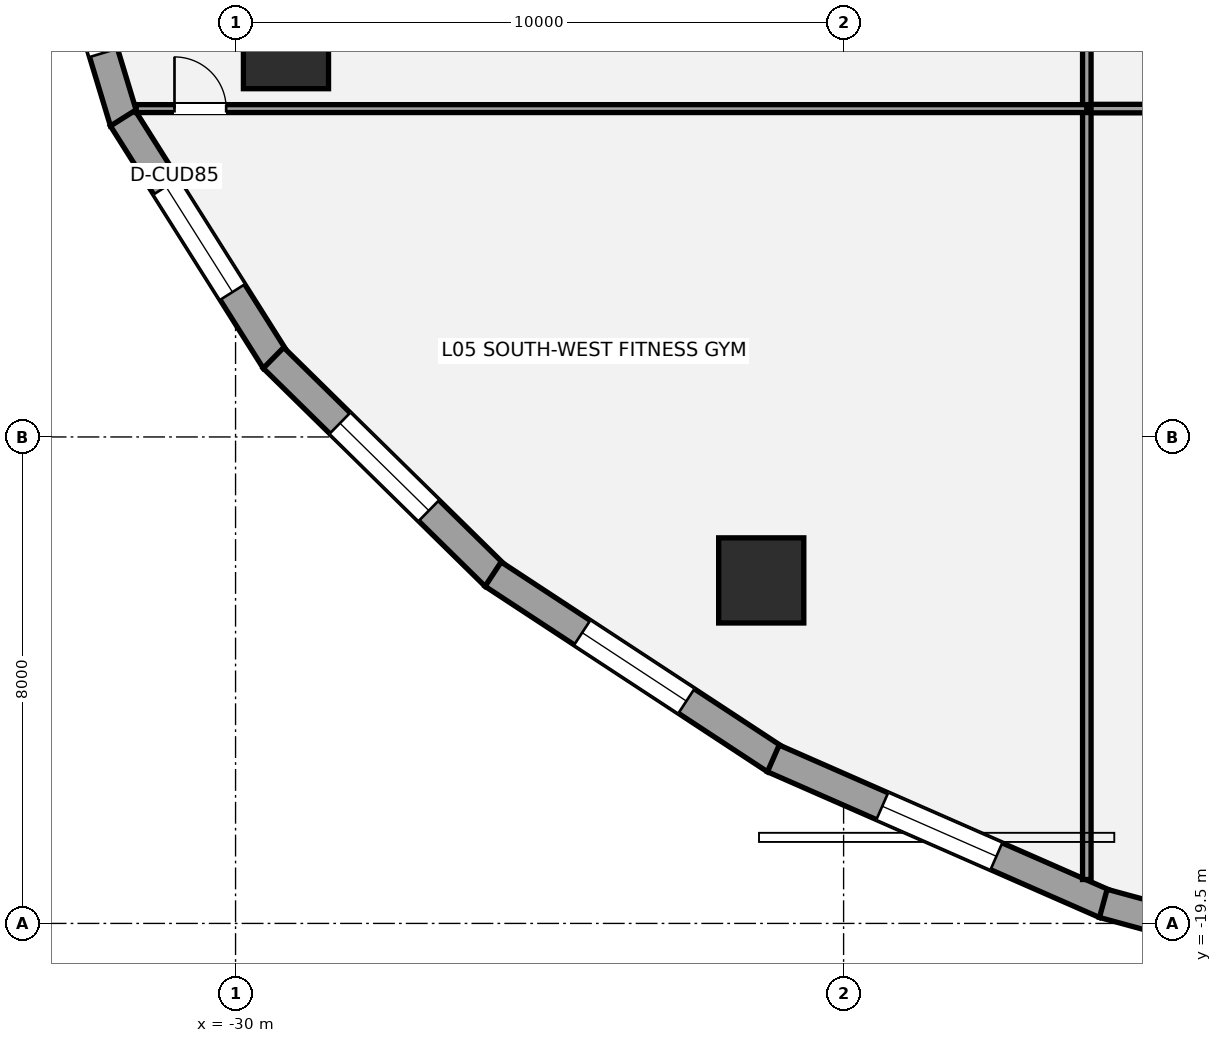
"""IFC4 building model, lengths in metres.
Left out: names, types, materials, properties, quantities, classifications, styles, units other than length and angle.
Written with IfcOpenShell. Run it as: python <this file> out.ifc"""

import sys

from ifc_helpers import new_model, si_unit, direction, frame, frame_2d, origin, origin_2d, place, context, subcontext, project, spatial, rectangle, hollow_circle, extrude, element, fill, save


model = new_model("IFC4")
c1 = context("Model", 3, precision=1e-05, world=origin(), true_north=direction((0.0, 1.0)))
c2 = subcontext(c1, "Body", "Model", "MODEL_VIEW")
j1 = project(units=[si_unit("LENGTHUNIT", "METRE"), si_unit("PLANEANGLEUNIT", "RADIAN")], contexts=[c1])
p1 = place(None, origin())
s1 = spatial("IfcSite", under=j1, at=p1, CompositionType="ELEMENT")
p2 = place(p1, origin())
s2 = spatial("IfcBuilding", under=s1, at=p2, CompositionType="ELEMENT")
p3 = place(p2, frame((0.0, 0.0, 22.8)))
s3 = spatial("IfcBuildingStorey", under=s2, at=p3, CompositionType="ELEMENT", Elevation=22.8)
for number, where, z_axis, x_axis in (
    (1, (-29.171, -5.073, 0.0), (0.0, 0.0, 1.0), (1.0, 0.0, 0.0)),
    (2, (-21.354, -13.859, 0.0), (0.0, 0.0, 1.0), (1.0, 0.0, 0.0)),
):
    element("IfcColumn", number, at=place(p3, frame(where, z_axis=z_axis, x_axis=x_axis)), inside=s3, PredefinedType="USERDEFINED", context=c2, shape_type="SweptSolid", body=[
        extrude(hollow_circle(Radius=0.7, WallThickness=0.05, at=origin_2d()), origin(), (0.0, 0.0, 1.0), 4.13),
    ])
p4 = place(p3, frame((-31.828, -6.317, 0.0), z_axis=(0.0, 0.0, 1.0), x_axis=(-0.289855603468, 0.957070388811, 0.0)))
e3 = element("IfcWall", 3, at=p4, inside=s3, PredefinedType="STANDARD", context=c2, shape_type="SweptSolid", body=[
    extrude(rectangle(XDim=4.419, YDim=0.48, at=frame_2d((2.21, 0.0))), origin(), (0.0, 0.0, 1.0), 3.033),
])
p5 = place(p4, frame((1.185, 0.0, 0.72)))
e4 = element("IfcOpeningElement", 4, at=p5, cuts=e3, PredefinedType="OPENING", context=c2, shape_type="SweptSolid", body=[
    extrude(rectangle(XDim=2.05, YDim=1.8, at=frame_2d((1.025, 0.9))), frame((0.0, 0.25, 0.0), z_axis=(0.0, -1.0, 0.0), x_axis=(1.0, 0.0, 0.0)), (0.0, 0.0, 1.0), 0.5),
])
p6 = place(p3, frame((-29.341, -10.243, 0.0), z_axis=(0.0, 0.0, 1.0), x_axis=(-0.53349762721, 0.845801561693, 0.0)))
e5 = element("IfcWall", 5, at=p6, inside=s3, PredefinedType="STANDARD", context=c2, shape_type="SweptSolid", body=[
    extrude(rectangle(XDim=4.711, YDim=0.48, at=frame_2d((2.355, 0.0))), origin(), (0.0, 0.0, 1.0), 3.033),
])
p7 = place(p6, frame((1.33, 0.0, 0.72)))
e6 = element("IfcOpeningElement", 6, at=p7, cuts=e5, PredefinedType="OPENING", context=c2, shape_type="SweptSolid", body=[
    extrude(rectangle(XDim=2.05, YDim=1.8, at=frame_2d((1.025, 0.9))), frame((0.0, 0.25, 0.0), z_axis=(0.0, -1.0, 0.0), x_axis=(1.0, 0.0, 0.0)), (0.0, 0.0, 1.0), 0.5),
])
p8 = place(p3, frame((-25.728, -13.785, 0.0), z_axis=(0.0, 0.0, 1.0), x_axis=(-0.713189080178, 0.700971708355, 0.0)))
e7 = element("IfcWall", 7, at=p8, inside=s3, PredefinedType="STANDARD", context=c2, shape_type="SweptSolid", body=[
    extrude(rectangle(XDim=5.116, YDim=0.48, at=frame_2d((2.558, 0.0))), origin(), (0.0, 0.0, 1.0), 3.033),
])
p9 = place(p8, frame((1.533, 0.0, 0.72)))
e8 = element("IfcOpeningElement", 8, at=p9, cuts=e7, PredefinedType="OPENING", context=c2, shape_type="SweptSolid", body=[
    extrude(rectangle(XDim=2.05, YDim=1.8, at=frame_2d((1.025, 0.9))), frame((0.0, 0.25, 0.0), z_axis=(0.0, -1.0, 0.0), x_axis=(1.0, 0.0, 0.0)), (0.0, 0.0, 1.0), 0.5),
])
p10 = place(p3, frame((-21.121, -16.806, 0.0), z_axis=(0.0, 0.0, 1.0), x_axis=(-0.835863918172, 0.548936708827, 0.0)))
e9 = element("IfcWall", 9, at=p10, inside=s3, PredefinedType="STANDARD", context=c2, shape_type="SweptSolid", body=[
    extrude(rectangle(XDim=5.555, YDim=0.48, at=frame_2d((2.778, 0.0))), origin(), (0.0, 0.0, 1.0), 3.033),
])
p11 = place(p10, frame((1.753, 0.0, 0.72)))
e10 = element("IfcOpeningElement", 10, at=p11, cuts=e9, PredefinedType="OPENING", context=c2, shape_type="SweptSolid", body=[
    extrude(rectangle(XDim=2.05, YDim=1.8, at=frame_2d((1.025, 0.9))), frame((0.0, 0.25, 0.0), z_axis=(0.0, -1.0, 0.0), x_axis=(1.0, 0.0, 0.0)), (0.0, 0.0, 1.0), 0.5),
])
p12 = place(p3, frame((-15.695, -19.183, 0.0), z_axis=(0.0, 0.0, 1.0), x_axis=(-0.91570760638, 0.401845218484, 0.0)))
e11 = element("IfcWall", 11, at=p12, inside=s3, PredefinedType="STANDARD", context=c2, shape_type="SweptSolid", body=[
    extrude(rectangle(XDim=5.963, YDim=0.48, at=frame_2d((2.981, 0.0))), origin(), (0.0, 0.0, 1.0), 3.033),
])
p13 = place(p12, frame((1.957, 0.0, 0.72)))
e12 = element("IfcOpeningElement", 12, at=p13, cuts=e11, PredefinedType="OPENING", context=c2, shape_type="SweptSolid", body=[
    extrude(rectangle(XDim=2.05, YDim=1.8, at=frame_2d((1.025, 0.9))), frame((0.0, 0.25, 0.0), z_axis=(0.0, -1.0, 0.0), x_axis=(1.0, 0.0, 0.0)), (0.0, 0.0, 1.0), 0.5),
])
p14 = place(p3, frame((-9.662, -20.821, 0.0), z_axis=(0.0, 0.0, 1.0), x_axis=(-0.964936550718, 0.262483243445, 0.0)))
e13 = element("IfcWall", 13, at=p14, inside=s3, PredefinedType="STANDARD", context=c2, shape_type="SweptSolid", body=[
    extrude(rectangle(XDim=6.288, YDim=0.48, at=frame_2d((3.144, 0.0))), origin(), (0.0, 0.0, 1.0), 3.033),
])
p15 = place(p14, frame((2.119, 0.0, 0.72)))
e14 = element("IfcOpeningElement", 14, at=p15, cuts=e13, PredefinedType="OPENING", context=c2, shape_type="SweptSolid", body=[
    extrude(rectangle(XDim=2.05, YDim=1.8, at=frame_2d((1.025, 0.9))), frame((0.0, 0.25, 0.0), z_axis=(0.0, -1.0, 0.0), x_axis=(1.0, 0.0, 0.0)), (0.0, 0.0, 1.0), 0.5),
])
p16 = place(p3, frame((-16.0, -6.1, 0.0), z_axis=(0.0, 0.0, 1.0), x_axis=(1.0, 0.0, 0.0)))
e15 = element("IfcWall", 15, at=p16, inside=s3, PredefinedType="PARTITIONING", context=c2, shape_type="SweptSolid", body=[
    extrude(rectangle(XDim=34.4, YDim=0.14, at=frame_2d((17.2, 0.0))), origin(), (0.0, 0.0, 1.0), 2.09),
])
p17 = place(p16, frame((5.5, 0.0, 0.0)))
e16 = element("IfcOpeningElement", 16, at=p17, cuts=e15, PredefinedType="OPENING", context=c2, shape_type="SweptSolid", body=[
    extrude(rectangle(XDim=0.85, YDim=2.0, at=frame_2d((0.425, 1.0))), frame((0.0, 0.08, 0.0), z_axis=(0.0, -1.0, 0.0), x_axis=(1.0, 0.0, 0.0)), (0.0, 0.0, 1.0), 0.16),
])
p18 = place(p16, frame((17.9, 0.0, 0.0)))
e17 = element("IfcOpeningElement", 17, at=p18, cuts=e15, PredefinedType="OPENING", context=c2, shape_type="SweptSolid", body=[
    extrude(rectangle(XDim=0.85, YDim=2.0, at=frame_2d((0.425, 1.0))), frame((0.0, 0.08, 0.0), z_axis=(0.0, -1.0, 0.0), x_axis=(1.0, 0.0, 0.0)), (0.0, 0.0, 1.0), 0.16),
])
p19 = place(p16, frame((28.85, 0.0, 0.0)))
e18 = element("IfcOpeningElement", 18, at=p19, cuts=e15, PredefinedType="OPENING", context=c2, shape_type="SweptSolid", body=[
    extrude(rectangle(XDim=0.85, YDim=2.0, at=frame_2d((0.425, 1.0))), frame((0.0, 0.08, 0.0), z_axis=(0.0, -1.0, 0.0), x_axis=(1.0, 0.0, 0.0)), (0.0, 0.0, 1.0), 0.16),
])
p20 = place(p3, frame((-16.0, -18.778, 0.0), z_axis=(0.0, 0.0, 1.0), x_axis=(0.0, 1.0, 0.0)))
e19 = element("IfcWall", 19, at=p20, inside=s3, PredefinedType="PARTITIONING", context=c2, shape_type="SweptSolid", body=[
    extrude(rectangle(XDim=26.328, YDim=0.14, at=frame_2d((13.164, 0.0))), origin(), (0.0, 0.0, 1.0), 2.09),
])
p21 = place(p20, frame((14.378, 0.0, 0.0)))
e20 = element("IfcOpeningElement", 20, at=p21, cuts=e19, PredefinedType="OPENING", context=c2, shape_type="SweptSolid", body=[
    extrude(rectangle(XDim=0.85, YDim=2.0, at=frame_2d((0.425, 1.0))), frame((0.0, 0.08, 0.0), z_axis=(0.0, -1.0, 0.0), x_axis=(1.0, 0.0, 0.0)), (0.0, 0.0, 1.0), 0.16),
])
p22 = place(p20, frame((19.128, 0.0, 0.0)))
e21 = element("IfcOpeningElement", 21, at=p22, cuts=e19, PredefinedType="OPENING", context=c2, shape_type="SweptSolid", body=[
    extrude(rectangle(XDim=0.85, YDim=2.0, at=frame_2d((0.425, 1.0))), frame((0.0, 0.08, 0.0), z_axis=(0.0, -1.0, 0.0), x_axis=(1.0, 0.0, 0.0)), (0.0, 0.0, 1.0), 0.16),
])
p23 = place(p20, frame((23.803, 0.0, 0.0)))
e22 = element("IfcOpeningElement", 22, at=p23, cuts=e19, PredefinedType="OPENING", context=c2, shape_type="SweptSolid", body=[
    extrude(rectangle(XDim=0.85, YDim=2.0, at=frame_2d((0.425, 1.0))), frame((0.0, 0.08, 0.0), z_axis=(0.0, -1.0, 0.0), x_axis=(1.0, 0.0, 0.0)), (0.0, 0.0, 1.0), 0.16),
])
p24 = place(p3, frame((-31.634, -6.1, 0.0), z_axis=(0.0, 0.0, 1.0), x_axis=(1.0, 0.0, 0.0)))
e23 = element("IfcWall", 23, at=p24, inside=s3, PredefinedType="PARTITIONING", context=c2, shape_type="SweptSolid", body=[
    extrude(rectangle(XDim=15.634, YDim=0.13, at=frame_2d((7.817, 0.0))), origin(), (0.0, 0.0, 1.0), 2.09),
])
p25 = place(p24, frame((0.63, 0.0, 0.0)))
e24 = element("IfcOpeningElement", 24, at=p25, cuts=e23, PredefinedType="OPENING", context=c2, shape_type="SweptSolid", body=[
    extrude(rectangle(XDim=0.85, YDim=2.0, at=frame_2d((0.425, 1.0))), frame((0.0, 0.075, 0.0), z_axis=(0.0, -1.0, 0.0), x_axis=(1.0, 0.0, 0.0)), (0.0, 0.0, 1.0), 0.15),
])
p26 = place(p7, origin())
e25 = element("IfcWindow", 25, at=p26, inside=s3, PartitioningType="SINGLE_PANEL", PredefinedType="WINDOW", context=c2, shape_type="SweptSolid", body=[
    extrude(rectangle(XDim=2.05, YDim=1.8, at=frame_2d((1.025, 0.9))), frame((0.0, -0.01, 0.0), z_axis=(0.0, -1.0, 0.0), x_axis=(1.0, 0.0, 0.0)), (0.0, 0.0, 1.0), 0.06),
])
fill(e6, e25)
p27 = place(p9, origin())
e26 = element("IfcWindow", 26, at=p27, inside=s3, PartitioningType="SINGLE_PANEL", PredefinedType="WINDOW", context=c2, shape_type="SweptSolid", body=[
    extrude(rectangle(XDim=2.05, YDim=1.8, at=frame_2d((1.025, 0.9))), frame((0.0, -0.01, 0.0), z_axis=(0.0, -1.0, 0.0), x_axis=(1.0, 0.0, 0.0)), (0.0, 0.0, 1.0), 0.06),
])
fill(e8, e26)
p28 = place(p11, origin())
e27 = element("IfcWindow", 27, at=p28, inside=s3, PartitioningType="SINGLE_PANEL", PredefinedType="WINDOW", context=c2, shape_type="SweptSolid", body=[
    extrude(rectangle(XDim=2.05, YDim=1.8, at=frame_2d((1.025, 0.9))), frame((0.0, -0.01, 0.0), z_axis=(0.0, -1.0, 0.0), x_axis=(1.0, 0.0, 0.0)), (0.0, 0.0, 1.0), 0.06),
])
fill(e10, e27)
p29 = place(p13, origin())
e28 = element("IfcWindow", 28, at=p29, inside=s3, PartitioningType="SINGLE_PANEL", PredefinedType="WINDOW", context=c2, shape_type="SweptSolid", body=[
    extrude(rectangle(XDim=2.05, YDim=1.8, at=frame_2d((1.025, 0.9))), frame((0.0, -0.01, 0.0), z_axis=(0.0, -1.0, 0.0), x_axis=(1.0, 0.0, 0.0)), (0.0, 0.0, 1.0), 0.06),
])
fill(e12, e28)
p30 = place(p25, origin())
e29 = element("IfcDoor", 29, at=p30, inside=s3, OperationType="SINGLE_SWING_LEFT", PredefinedType="DOOR", context=c2, shape_type="SweptSolid", body=[
    extrude(rectangle(XDim=0.85, YDim=2.0, at=frame_2d((0.425, 1.0))), frame((0.0, 0.025, 0.0), z_axis=(0.0, -1.0, 0.0), x_axis=(1.0, 0.0, 0.0)), (0.0, 0.0, 1.0), 0.05),
])
fill(e24, e29)
save(model, sys.argv[1])
